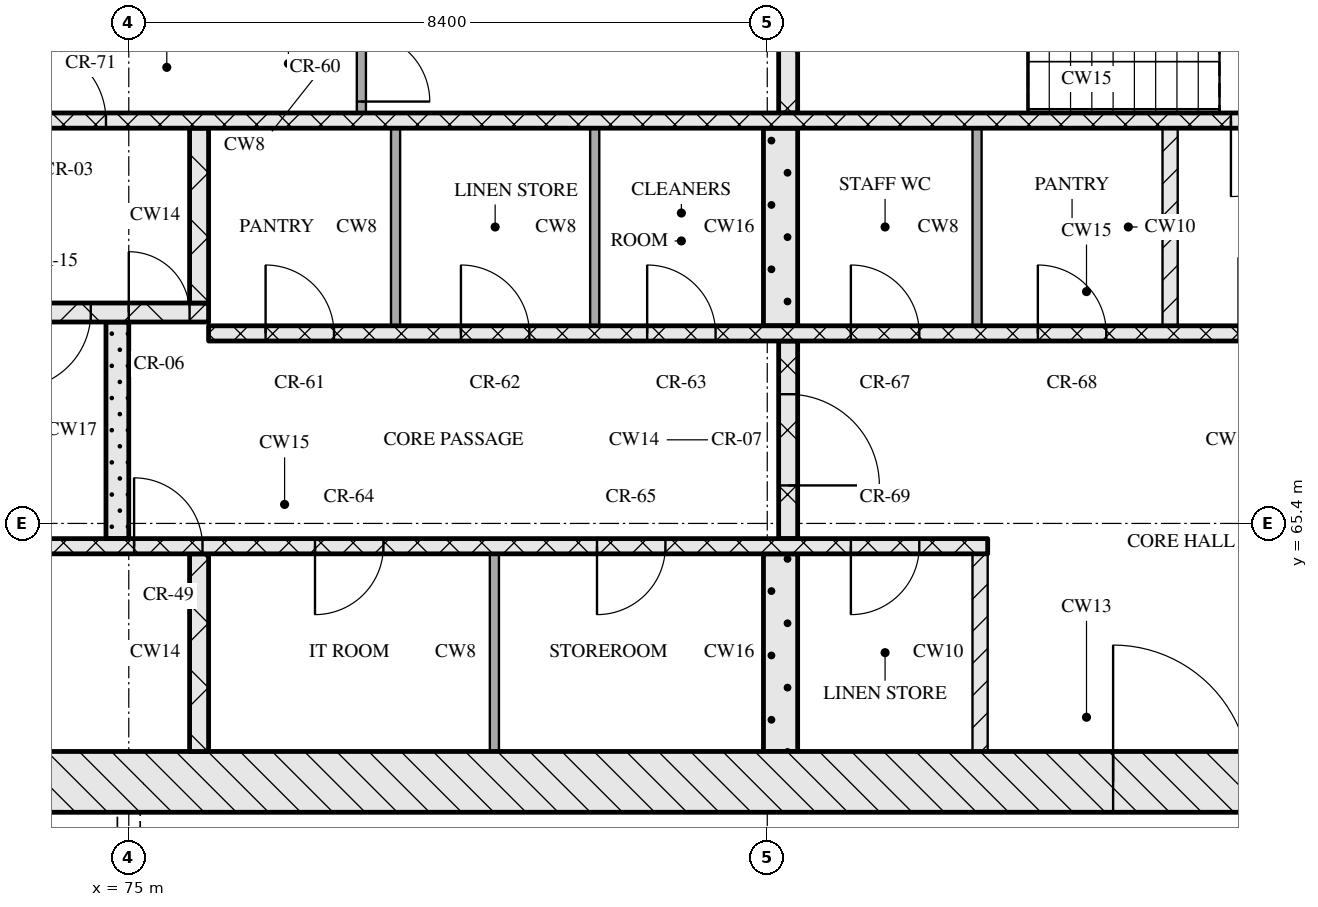
"""IFC4 building model, lengths in metres.
Left out: names, types, materials, properties, quantities, classifications, styles, units other than length and angle.
Written with IfcOpenShell. Run it as: python <this file> out.ifc"""

import sys

from ifc_helpers import new_model, si_unit, direction, frame, frame_2d, origin, place, context, subcontext, project, spatial, rectangle, extrude, element, fill, save


model = new_model("IFC4")
c1 = context("Model", 3, precision=1e-05, world=origin(), true_north=direction((0.0, 1.0)))
c2 = subcontext(c1, "Body", "Model", "MODEL_VIEW")
j1 = project(units=[si_unit("LENGTHUNIT", "METRE"), si_unit("PLANEANGLEUNIT", "RADIAN")], contexts=[c1])
p1 = place(None, origin())
s1 = spatial("IfcSite", under=j1, at=p1, CompositionType="ELEMENT")
p2 = place(p1, origin())
s2 = spatial("IfcBuilding", under=s1, at=p2, CompositionType="ELEMENT")
p3 = place(p2, frame((0.0, 0.0, 187.05)))
s3 = spatial("IfcBuildingStorey", under=s2, at=p3, CompositionType="ELEMENT", Elevation=187.05)
p4 = place(p3, frame((67.0, 62.0, 0.0), z_axis=(0.0, 0.0, 1.0), x_axis=(1.0, 0.0, 0.0)))
e1 = element("IfcWall", 1, at=p4, inside=s3, PredefinedType="SOLIDWALL", context=c2, shape_type="SweptSolid", body=[
    extrude(rectangle(XDim=41.2, YDim=0.8, at=frame_2d((20.6, 0.0))), origin(), (0.0, 0.0, 1.0), 3.32),
])
p5 = place(p4, frame((20.95, 0.0, 0.0)))
e2 = element("IfcOpeningElement", 2, at=p5, cuts=e1, PredefinedType="OPENING", context=c2, shape_type="SweptSolid", body=[
    extrude(rectangle(XDim=1.8, YDim=2.1, at=frame_2d((0.9, 1.05))), frame((0.0, 0.41, 0.0), z_axis=(0.0, -1.0, 0.0), x_axis=(1.0, 0.0, 0.0)), (0.0, 0.0, 1.0), 0.82),
])
p6 = place(p3, frame((75.925, 62.4, 0.0), z_axis=(0.0, 0.0, 1.0), x_axis=(0.0, 1.0, 0.0)))
e3 = element("IfcWall", 3, at=p6, inside=s3, PredefinedType="SOLIDWALL", context=c2, shape_type="SweptSolid", body=[
    extrude(rectangle(XDim=2.6, YDim=0.25, at=frame_2d((1.3, 0.0))), origin(), (0.0, 0.0, 1.0), 3.32),
])
p7 = place(p3, frame((79.81, 62.4, 0.0), z_axis=(0.0, 0.0, 1.0), x_axis=(0.0, 1.0, 0.0)))
e4 = element("IfcWall", 4, at=p7, inside=s3, PredefinedType="PARTITIONING", context=c2, shape_type="SweptSolid", body=[
    extrude(rectangle(XDim=2.6, YDim=0.12, at=frame_2d((1.3, 0.0))), origin(), (0.0, 0.0, 1.0), 3.32),
])
p8 = place(p3, frame((83.575, 62.4, 0.0), z_axis=(0.0, 0.0, 1.0), x_axis=(0.0, 1.0, 0.0)))
e5 = element("IfcWall", 5, at=p8, inside=s3, PredefinedType="SOLIDWALL", context=c2, shape_type="SweptSolid", body=[
    extrude(rectangle(XDim=2.6, YDim=0.45, at=frame_2d((1.3, 0.0))), origin(), (0.0, 0.0, 1.0), 3.32),
])
p9 = place(p3, frame((86.2, 62.4, 0.0), z_axis=(0.0, 0.0, 1.0), x_axis=(0.0, 1.0, 0.0)))
e6 = element("IfcWall", 6, at=p9, inside=s3, PredefinedType="PARTITIONING", context=c2, shape_type="SweptSolid", body=[
    extrude(rectangle(XDim=2.6, YDim=0.2, at=frame_2d((1.3, 0.0))), origin(), (0.0, 0.0, 1.0), 3.32),
])
p10 = place(p3, frame((67.8, 65.1, 0.0), z_axis=(0.0, 0.0, 1.0), x_axis=(1.0, 0.0, 0.0)))
e7 = element("IfcWall", 7, at=p10, inside=s3, PredefinedType="SOLIDWALL", context=c2, shape_type="SweptSolid", body=[
    extrude(rectangle(XDim=18.5, YDim=0.2, at=frame_2d((9.25, 0.0))), origin(), (0.0, 0.0, 1.0), 3.32),
])
p11 = place(p10, frame((7.27, 0.0, 0.0)))
e8 = element("IfcOpeningElement", 8, at=p11, cuts=e7, PredefinedType="OPENING", context=c2, shape_type="SweptSolid", body=[
    extrude(rectangle(XDim=0.9, YDim=2.1, at=frame_2d((0.45, 1.05))), frame((0.0, 0.11, 0.0), z_axis=(0.0, -1.0, 0.0), x_axis=(1.0, 0.0, 0.0)), (0.0, 0.0, 1.0), 0.22),
])
p12 = place(p10, frame((9.65, 0.0, 0.0)))
e9 = element("IfcOpeningElement", 9, at=p12, cuts=e7, PredefinedType="OPENING", context=c2, shape_type="SweptSolid", body=[
    extrude(rectangle(XDim=0.9, YDim=2.1, at=frame_2d((0.45, 1.05))), frame((0.0, 0.11, 0.0), z_axis=(0.0, -1.0, 0.0), x_axis=(1.0, 0.0, 0.0)), (0.0, 0.0, 1.0), 0.22),
])
p13 = place(p10, frame((13.36, 0.0, 0.0)))
e10 = element("IfcOpeningElement", 10, at=p13, cuts=e7, PredefinedType="OPENING", context=c2, shape_type="SweptSolid", body=[
    extrude(rectangle(XDim=0.9, YDim=2.1, at=frame_2d((0.45, 1.05))), frame((0.0, 0.11, 0.0), z_axis=(0.0, -1.0, 0.0), x_axis=(1.0, 0.0, 0.0)), (0.0, 0.0, 1.0), 0.22),
])
p14 = place(p10, frame((16.7, 0.0, 0.0)))
e11 = element("IfcOpeningElement", 11, at=p14, cuts=e7, PredefinedType="OPENING", context=c2, shape_type="SweptSolid", body=[
    extrude(rectangle(XDim=0.9, YDim=2.1, at=frame_2d((0.45, 1.05))), frame((0.0, 0.11, 0.0), z_axis=(0.0, -1.0, 0.0), x_axis=(1.0, 0.0, 0.0)), (0.0, 0.0, 1.0), 0.22),
])
p15 = place(p3, frame((74.85, 65.2, 0.0), z_axis=(0.0, 0.0, 1.0), x_axis=(0.0, 1.0, 0.0)))
e12 = element("IfcWall", 12, at=p15, inside=s3, PredefinedType="SOLIDWALL", context=c2, shape_type="SweptSolid", body=[
    extrude(rectangle(XDim=2.85, YDim=0.3, at=frame_2d((1.425, 0.0))), origin(), (0.0, 0.0, 1.0), 3.32),
])
p16 = place(p3, frame((83.675, 65.2, 0.0), z_axis=(0.0, 0.0, 1.0), x_axis=(0.0, 1.0, 0.0)))
e13 = element("IfcWall", 13, at=p16, inside=s3, PredefinedType="SOLIDWALL", context=c2, shape_type="SweptSolid", body=[
    extrude(rectangle(XDim=2.6, YDim=0.25, at=frame_2d((1.3, 0.0))), origin(), (0.0, 0.0, 1.0), 3.32),
])
p17 = place(p16, frame((0.7, 0.0, 0.0)))
e14 = element("IfcOpeningElement", 14, at=p17, cuts=e13, PredefinedType="OPENING", context=c2, shape_type="SweptSolid", body=[
    extrude(rectangle(XDim=1.2, YDim=2.1, at=frame_2d((0.6, 1.05))), frame((0.0, 0.135, 0.0), z_axis=(0.0, -1.0, 0.0), x_axis=(1.0, 0.0, 0.0)), (0.0, 0.0, 1.0), 0.27),
])
p18 = place(p3, frame((76.05, 67.9, 0.0), z_axis=(0.0, 0.0, 1.0), x_axis=(1.0, 0.0, 0.0)))
e15 = element("IfcWall", 15, at=p18, inside=s3, PredefinedType="SOLIDWALL", context=c2, shape_type="SweptSolid", body=[
    extrude(rectangle(XDim=23.1, YDim=0.2, at=frame_2d((11.55, 0.0))), origin(), (0.0, 0.0, 1.0), 3.32),
])
p19 = place(p18, frame((0.75, 0.0, 0.0)))
e16 = element("IfcOpeningElement", 16, at=p19, cuts=e15, PredefinedType="OPENING", context=c2, shape_type="SweptSolid", body=[
    extrude(rectangle(XDim=0.9, YDim=2.1, at=frame_2d((0.45, 1.05))), frame((0.0, 0.11, 0.0), z_axis=(0.0, -1.0, 0.0), x_axis=(1.0, 0.0, 0.0)), (0.0, 0.0, 1.0), 0.22),
])
p20 = place(p18, frame((3.32, 0.0, 0.0)))
e17 = element("IfcOpeningElement", 17, at=p20, cuts=e15, PredefinedType="OPENING", context=c2, shape_type="SweptSolid", body=[
    extrude(rectangle(XDim=0.9, YDim=2.1, at=frame_2d((0.45, 1.05))), frame((0.0, 0.11, 0.0), z_axis=(0.0, -1.0, 0.0), x_axis=(1.0, 0.0, 0.0)), (0.0, 0.0, 1.0), 0.22),
])
p21 = place(p18, frame((5.77, 0.0, 0.0)))
e18 = element("IfcOpeningElement", 18, at=p21, cuts=e15, PredefinedType="OPENING", context=c2, shape_type="SweptSolid", body=[
    extrude(rectangle(XDim=0.9, YDim=2.1, at=frame_2d((0.45, 1.05))), frame((0.0, 0.11, 0.0), z_axis=(0.0, -1.0, 0.0), x_axis=(1.0, 0.0, 0.0)), (0.0, 0.0, 1.0), 0.22),
])
p22 = place(p18, frame((8.45, 0.0, 0.0)))
e19 = element("IfcOpeningElement", 19, at=p22, cuts=e15, PredefinedType="OPENING", context=c2, shape_type="SweptSolid", body=[
    extrude(rectangle(XDim=0.9, YDim=2.1, at=frame_2d((0.45, 1.05))), frame((0.0, 0.11, 0.0), z_axis=(0.0, -1.0, 0.0), x_axis=(1.0, 0.0, 0.0)), (0.0, 0.0, 1.0), 0.22),
])
p23 = place(p18, frame((10.91, 0.0, 0.0)))
e20 = element("IfcOpeningElement", 20, at=p23, cuts=e15, PredefinedType="OPENING", context=c2, shape_type="SweptSolid", body=[
    extrude(rectangle(XDim=0.9, YDim=2.1, at=frame_2d((0.45, 1.05))), frame((0.0, 0.11, 0.0), z_axis=(0.0, -1.0, 0.0), x_axis=(1.0, 0.0, 0.0)), (0.0, 0.0, 1.0), 0.22),
])
p24 = place(p18, frame((13.55, 0.0, 0.0)))
e21 = element("IfcOpeningElement", 21, at=p24, cuts=e15, PredefinedType="OPENING", context=c2, shape_type="SweptSolid", body=[
    extrude(rectangle(XDim=1.0, YDim=2.1, at=frame_2d((0.5, 1.05))), frame((0.0, 0.11, 0.0), z_axis=(0.0, -1.0, 0.0), x_axis=(1.0, 0.0, 0.0)), (0.0, 0.0, 1.0), 0.22),
])
p25 = place(p18, frame((16.2, 0.0, 0.0)))
e22 = element("IfcOpeningElement", 22, at=p25, cuts=e15, PredefinedType="OPENING", context=c2, shape_type="SweptSolid", body=[
    extrude(rectangle(XDim=1.1, YDim=2.1, at=frame_2d((0.55, 1.05))), frame((0.0, 0.11, 0.0), z_axis=(0.0, -1.0, 0.0), x_axis=(1.0, 0.0, 0.0)), (0.0, 0.0, 1.0), 0.22),
])
p26 = place(p18, frame((18.7, 0.0, 0.0)))
e23 = element("IfcOpeningElement", 23, at=p26, cuts=e15, PredefinedType="OPENING", context=c2, shape_type="SweptSolid", body=[
    extrude(rectangle(XDim=1.1, YDim=2.1, at=frame_2d((0.55, 1.05))), frame((0.0, 0.11, 0.0), z_axis=(0.0, -1.0, 0.0), x_axis=(1.0, 0.0, 0.0)), (0.0, 0.0, 1.0), 0.22),
])
p27 = place(p18, frame((21.2, 0.0, 0.0)))
e24 = element("IfcOpeningElement", 24, at=p27, cuts=e15, PredefinedType="OPENING", context=c2, shape_type="SweptSolid", body=[
    extrude(rectangle(XDim=1.1, YDim=2.1, at=frame_2d((0.55, 1.05))), frame((0.0, 0.11, 0.0), z_axis=(0.0, -1.0, 0.0), x_axis=(1.0, 0.0, 0.0)), (0.0, 0.0, 1.0), 0.22),
])
for number, where, z_axis, x_axis in (
    (25, (78.51, 68.0, 0.0), (0.0, 0.0, 1.0), (0.0, 1.0, 0.0)),
    (26, (81.13, 68.0, 0.0), (0.0, 0.0, 1.0), (0.0, 1.0, 0.0)),
):
    element("IfcWall", number, at=place(p3, frame(where, z_axis=z_axis, x_axis=x_axis)), inside=s3, PredefinedType="PARTITIONING", context=c2, shape_type="SweptSolid", body=[
        extrude(rectangle(XDim=2.6, YDim=0.12, at=frame_2d((1.3, 0.0))), origin(), (0.0, 0.0, 1.0), 3.32),
    ])
p28 = place(p3, frame((83.575, 68.0, 0.0), z_axis=(0.0, 0.0, 1.0), x_axis=(0.0, 1.0, 0.0)))
e27 = element("IfcWall", 27, at=p28, inside=s3, PredefinedType="SOLIDWALL", context=c2, shape_type="SweptSolid", body=[
    extrude(rectangle(XDim=2.6, YDim=0.45, at=frame_2d((1.3, 0.0))), origin(), (0.0, 0.0, 1.0), 3.32),
])
p29 = place(p3, frame((86.16, 68.0, 0.0), z_axis=(0.0, 0.0, 1.0), x_axis=(0.0, 1.0, 0.0)))
e28 = element("IfcWall", 28, at=p29, inside=s3, PredefinedType="PARTITIONING", context=c2, shape_type="SweptSolid", body=[
    extrude(rectangle(XDim=2.6, YDim=0.12, at=frame_2d((1.3, 0.0))), origin(), (0.0, 0.0, 1.0), 3.32),
])
p30 = place(p3, frame((88.7, 68.0, 0.0), z_axis=(0.0, 0.0, 1.0), x_axis=(0.0, 1.0, 0.0)))
e29 = element("IfcWall", 29, at=p30, inside=s3, PredefinedType="PARTITIONING", context=c2, shape_type="SweptSolid", body=[
    extrude(rectangle(XDim=2.6, YDim=0.2, at=frame_2d((1.3, 0.0))), origin(), (0.0, 0.0, 1.0), 3.32),
])
p31 = place(p3, frame((67.8, 68.175, 0.0), z_axis=(0.0, 0.0, 1.0), x_axis=(1.0, 0.0, 0.0)))
e30 = element("IfcWall", 30, at=p31, inside=s3, PredefinedType="SOLIDWALL", context=c2, shape_type="SweptSolid", body=[
    extrude(rectangle(XDim=8.25, YDim=0.25, at=frame_2d((4.125, 0.0))), origin(), (0.0, 0.0, 1.0), 3.32),
])
p32 = place(p31, frame((5.7, 0.0, 0.0)))
e31 = element("IfcOpeningElement", 31, at=p32, cuts=e30, PredefinedType="OPENING", context=c2, shape_type="SweptSolid", body=[
    extrude(rectangle(XDim=1.0, YDim=2.1, at=frame_2d((0.5, 1.05))), frame((0.0, 0.135, 0.0), z_axis=(0.0, -1.0, 0.0), x_axis=(1.0, 0.0, 0.0)), (0.0, 0.0, 1.0), 0.27),
])
p33 = place(p31, frame((7.2, 0.0, 0.0)))
e32 = element("IfcOpeningElement", 32, at=p33, cuts=e30, PredefinedType="OPENING", context=c2, shape_type="SweptSolid", body=[
    extrude(rectangle(XDim=0.8, YDim=2.1, at=frame_2d((0.4, 1.05))), frame((0.0, 0.135, 0.0), z_axis=(0.0, -1.0, 0.0), x_axis=(1.0, 0.0, 0.0)), (0.0, 0.0, 1.0), 0.27),
])
p34 = place(p3, frame((75.925, 68.3, 0.0), z_axis=(0.0, 0.0, 1.0), x_axis=(0.0, 1.0, 0.0)))
e33 = element("IfcWall", 33, at=p34, inside=s3, PredefinedType="SOLIDWALL", context=c2, shape_type="SweptSolid", body=[
    extrude(rectangle(XDim=2.3, YDim=0.25, at=frame_2d((1.15, 0.0))), origin(), (0.0, 0.0, 1.0), 3.32),
])
p35 = place(p3, frame((67.8, 70.7, 0.0), z_axis=(0.0, 0.0, 1.0), x_axis=(1.0, 0.0, 0.0)))
e34 = element("IfcWall", 34, at=p35, inside=s3, PredefinedType="SOLIDWALL", context=c2, shape_type="SweptSolid", body=[
    extrude(rectangle(XDim=39.6, YDim=0.2, at=frame_2d((19.8, 0.0))), origin(), (0.0, 0.0, 1.0), 3.32),
])
p36 = place(p35, frame((0.65, 0.0, 0.0)))
e35 = element("IfcOpeningElement", 35, at=p36, cuts=e34, PredefinedType="OPENING", context=c2, shape_type="SweptSolid", body=[
    extrude(rectangle(XDim=1.1, YDim=2.1, at=frame_2d((0.55, 1.05))), frame((0.0, 0.11, 0.0), z_axis=(0.0, -1.0, 0.0), x_axis=(1.0, 0.0, 0.0)), (0.0, 0.0, 1.0), 0.22),
])
p37 = place(p35, frame((3.25, 0.0, 0.0)))
e36 = element("IfcOpeningElement", 36, at=p37, cuts=e34, PredefinedType="OPENING", context=c2, shape_type="SweptSolid", body=[
    extrude(rectangle(XDim=1.1, YDim=2.1, at=frame_2d((0.55, 1.05))), frame((0.0, 0.11, 0.0), z_axis=(0.0, -1.0, 0.0), x_axis=(1.0, 0.0, 0.0)), (0.0, 0.0, 1.0), 0.22),
])
p38 = place(p35, frame((5.9, 0.0, 0.0)))
e37 = element("IfcOpeningElement", 37, at=p38, cuts=e34, PredefinedType="OPENING", context=c2, shape_type="SweptSolid", body=[
    extrude(rectangle(XDim=1.0, YDim=2.1, at=frame_2d((0.5, 1.05))), frame((0.0, 0.11, 0.0), z_axis=(0.0, -1.0, 0.0), x_axis=(1.0, 0.0, 0.0)), (0.0, 0.0, 1.0), 0.22),
])
p39 = place(p35, frame((21.7, 0.0, 0.0)))
e38 = element("IfcOpeningElement", 38, at=p39, cuts=e34, PredefinedType="OPENING", context=c2, shape_type="SweptSolid", body=[
    extrude(rectangle(XDim=1.0, YDim=2.1, at=frame_2d((0.5, 1.05))), frame((0.0, 0.11, 0.0), z_axis=(0.0, -1.0, 0.0), x_axis=(1.0, 0.0, 0.0)), (0.0, 0.0, 1.0), 0.22),
])
p40 = place(p35, frame((32.7, 0.0, 0.0)))
e39 = element("IfcOpeningElement", 39, at=p40, cuts=e34, PredefinedType="OPENING", context=c2, shape_type="SweptSolid", body=[
    extrude(rectangle(XDim=1.0, YDim=2.1, at=frame_2d((0.5, 1.05))), frame((0.0, 0.11, 0.0), z_axis=(0.0, -1.0, 0.0), x_axis=(1.0, 0.0, 0.0)), (0.0, 0.0, 1.0), 0.22),
])
p41 = place(p35, frame((35.25, 0.0, 0.0)))
e40 = element("IfcOpeningElement", 40, at=p41, cuts=e34, PredefinedType="OPENING", context=c2, shape_type="SweptSolid", body=[
    extrude(rectangle(XDim=1.1, YDim=2.1, at=frame_2d((0.55, 1.05))), frame((0.0, 0.11, 0.0), z_axis=(0.0, -1.0, 0.0), x_axis=(1.0, 0.0, 0.0)), (0.0, 0.0, 1.0), 0.22),
])
p42 = place(p35, frame((37.85, 0.0, 0.0)))
e41 = element("IfcOpeningElement", 41, at=p42, cuts=e34, PredefinedType="OPENING", context=c2, shape_type="SweptSolid", body=[
    extrude(rectangle(XDim=1.1, YDim=2.1, at=frame_2d((0.55, 1.05))), frame((0.0, 0.11, 0.0), z_axis=(0.0, -1.0, 0.0), x_axis=(1.0, 0.0, 0.0)), (0.0, 0.0, 1.0), 0.22),
])
p43 = place(p3, frame((78.06, 70.8, 0.0), z_axis=(0.0, 0.0, 1.0), x_axis=(0.0, 1.0, 0.0)))
e42 = element("IfcWall", 42, at=p43, inside=s3, PredefinedType="PARTITIONING", context=c2, shape_type="SweptSolid", body=[
    extrude(rectangle(XDim=1.2, YDim=0.12, at=frame_2d((0.6, 0.0))), origin(), (0.0, 0.0, 1.0), 3.32),
])
p44 = place(p43, frame((0.15, 0.0, 0.0)))
e43 = element("IfcOpeningElement", 43, at=p44, cuts=e42, PredefinedType="OPENING", context=c2, shape_type="SweptSolid", body=[
    extrude(rectangle(XDim=0.9, YDim=2.1, at=frame_2d((0.45, 1.05))), frame((0.0, 0.07, 0.0), z_axis=(0.0, -1.0, 0.0), x_axis=(1.0, 0.0, 0.0)), (0.0, 0.0, 1.0), 0.14),
])
p45 = place(p3, frame((83.675, 70.8, 0.0), z_axis=(0.0, 0.0, 1.0), x_axis=(0.0, 1.0, 0.0)))
e44 = element("IfcWall", 44, at=p45, inside=s3, PredefinedType="SOLIDWALL", context=c2, shape_type="SweptSolid", body=[
    extrude(rectangle(XDim=2.95, YDim=0.25, at=frame_2d((1.475, 0.0))), origin(), (0.0, 0.0, 1.0), 3.32),
])
p46 = place(p5, origin())
e45 = element("IfcDoor", 45, at=p46, inside=s3, OperationType="DOUBLE_DOOR_SINGLE_SWING", PredefinedType="DOOR", context=c2, shape_type="SweptSolid", body=[
    extrude(rectangle(XDim=1.8, YDim=2.1, at=frame_2d((0.9, 1.05))), frame((0.0, 0.025, 0.0), z_axis=(0.0, -1.0, 0.0), x_axis=(1.0, 0.0, 0.0)), (0.0, 0.0, 1.0), 0.05),
])
fill(e2, e45)
p47 = place(p11, origin())
e46 = element("IfcDoor", 46, at=p47, inside=s3, OperationType="SINGLE_SWING_LEFT", PredefinedType="DOOR", context=c2, shape_type="SweptSolid", body=[
    extrude(rectangle(XDim=0.9, YDim=2.1, at=frame_2d((0.45, 1.05))), frame((0.0, 0.025, 0.0), z_axis=(0.0, -1.0, 0.0), x_axis=(1.0, 0.0, 0.0)), (0.0, 0.0, 1.0), 0.05),
])
fill(e8, e46)
p48 = place(p12, origin())
e47 = element("IfcDoor", 47, at=p48, inside=s3, OperationType="SINGLE_SWING_RIGHT", PredefinedType="DOOR", context=c2, shape_type="SweptSolid", body=[
    extrude(rectangle(XDim=0.9, YDim=2.1, at=frame_2d((0.45, 1.05))), frame((0.0, 0.025, 0.0), z_axis=(0.0, -1.0, 0.0), x_axis=(1.0, 0.0, 0.0)), (0.0, 0.0, 1.0), 0.05),
])
fill(e9, e47)
p49 = place(p13, origin())
e48 = element("IfcDoor", 48, at=p49, inside=s3, OperationType="SINGLE_SWING_RIGHT", PredefinedType="DOOR", context=c2, shape_type="SweptSolid", body=[
    extrude(rectangle(XDim=0.9, YDim=2.1, at=frame_2d((0.45, 1.05))), frame((0.0, 0.025, 0.0), z_axis=(0.0, -1.0, 0.0), x_axis=(1.0, 0.0, 0.0)), (0.0, 0.0, 1.0), 0.05),
])
fill(e10, e48)
p50 = place(p14, origin())
e49 = element("IfcDoor", 49, at=p50, inside=s3, OperationType="SINGLE_SWING_RIGHT", PredefinedType="DOOR", context=c2, shape_type="SweptSolid", body=[
    extrude(rectangle(XDim=0.9, YDim=2.1, at=frame_2d((0.45, 1.05))), frame((0.0, 0.025, 0.0), z_axis=(0.0, -1.0, 0.0), x_axis=(1.0, 0.0, 0.0)), (0.0, 0.0, 1.0), 0.05),
])
fill(e11, e49)
p51 = place(p17, origin())
e50 = element("IfcDoor", 50, at=p51, inside=s3, OperationType="SINGLE_SWING_RIGHT", PredefinedType="DOOR", context=c2, shape_type="SweptSolid", body=[
    extrude(rectangle(XDim=1.2, YDim=2.1, at=frame_2d((0.6, 1.05))), frame((0.0, 0.025, 0.0), z_axis=(0.0, -1.0, 0.0), x_axis=(1.0, 0.0, 0.0)), (0.0, 0.0, 1.0), 0.05),
])
fill(e14, e50)
p52 = place(p19, origin())
e51 = element("IfcDoor", 51, at=p52, inside=s3, OperationType="SINGLE_SWING_LEFT", PredefinedType="DOOR", context=c2, shape_type="SweptSolid", body=[
    extrude(rectangle(XDim=0.9, YDim=2.1, at=frame_2d((0.45, 1.05))), frame((0.0, 0.025, 0.0), z_axis=(0.0, -1.0, 0.0), x_axis=(1.0, 0.0, 0.0)), (0.0, 0.0, 1.0), 0.05),
])
fill(e16, e51)
p53 = place(p20, origin())
e52 = element("IfcDoor", 52, at=p53, inside=s3, OperationType="SINGLE_SWING_LEFT", PredefinedType="DOOR", context=c2, shape_type="SweptSolid", body=[
    extrude(rectangle(XDim=0.9, YDim=2.1, at=frame_2d((0.45, 1.05))), frame((0.0, 0.025, 0.0), z_axis=(0.0, -1.0, 0.0), x_axis=(1.0, 0.0, 0.0)), (0.0, 0.0, 1.0), 0.05),
])
fill(e17, e52)
p54 = place(p21, origin())
e53 = element("IfcDoor", 53, at=p54, inside=s3, OperationType="SINGLE_SWING_LEFT", PredefinedType="DOOR", context=c2, shape_type="SweptSolid", body=[
    extrude(rectangle(XDim=0.9, YDim=2.1, at=frame_2d((0.45, 1.05))), frame((0.0, 0.025, 0.0), z_axis=(0.0, -1.0, 0.0), x_axis=(1.0, 0.0, 0.0)), (0.0, 0.0, 1.0), 0.05),
])
fill(e18, e53)
p55 = place(p22, origin())
e54 = element("IfcDoor", 54, at=p55, inside=s3, OperationType="SINGLE_SWING_LEFT", PredefinedType="DOOR", context=c2, shape_type="SweptSolid", body=[
    extrude(rectangle(XDim=0.9, YDim=2.1, at=frame_2d((0.45, 1.05))), frame((0.0, 0.025, 0.0), z_axis=(0.0, -1.0, 0.0), x_axis=(1.0, 0.0, 0.0)), (0.0, 0.0, 1.0), 0.05),
])
fill(e19, e54)
p56 = place(p23, origin())
e55 = element("IfcDoor", 55, at=p56, inside=s3, OperationType="SINGLE_SWING_LEFT", PredefinedType="DOOR", context=c2, shape_type="SweptSolid", body=[
    extrude(rectangle(XDim=0.9, YDim=2.1, at=frame_2d((0.45, 1.05))), frame((0.0, 0.025, 0.0), z_axis=(0.0, -1.0, 0.0), x_axis=(1.0, 0.0, 0.0)), (0.0, 0.0, 1.0), 0.05),
])
fill(e20, e55)
p57 = place(p32, origin())
e56 = element("IfcDoor", 56, at=p57, inside=s3, OperationType="SINGLE_SWING_RIGHT", PredefinedType="DOOR", context=c2, shape_type="SweptSolid", body=[
    extrude(rectangle(XDim=1.0, YDim=2.1, at=frame_2d((0.5, 1.05))), frame((0.0, 0.025, 0.0), z_axis=(0.0, -1.0, 0.0), x_axis=(1.0, 0.0, 0.0)), (0.0, 0.0, 1.0), 0.05),
])
fill(e31, e56)
p58 = place(p33, origin())
e57 = element("IfcDoor", 57, at=p58, inside=s3, OperationType="SINGLE_SWING_LEFT", PredefinedType="DOOR", context=c2, shape_type="SweptSolid", body=[
    extrude(rectangle(XDim=0.8, YDim=2.1, at=frame_2d((0.4, 1.05))), frame((0.0, 0.025, 0.0), z_axis=(0.0, -1.0, 0.0), x_axis=(1.0, 0.0, 0.0)), (0.0, 0.0, 1.0), 0.05),
])
fill(e32, e57)
p59 = place(p38, origin())
e58 = element("IfcDoor", 58, at=p59, inside=s3, OperationType="SINGLE_SWING_LEFT", PredefinedType="DOOR", context=c2, shape_type="SweptSolid", body=[
    extrude(rectangle(XDim=1.0, YDim=2.1, at=frame_2d((0.5, 1.05))), frame((0.0, 0.025, 0.0), z_axis=(0.0, -1.0, 0.0), x_axis=(1.0, 0.0, 0.0)), (0.0, 0.0, 1.0), 0.05),
])
fill(e37, e58)
p60 = place(p39, origin())
e59 = element("IfcDoor", 59, at=p60, inside=s3, OperationType="SINGLE_SWING_RIGHT", PredefinedType="DOOR", context=c2, shape_type="SweptSolid", body=[
    extrude(rectangle(XDim=1.0, YDim=2.1, at=frame_2d((0.5, 1.05))), frame((0.0, 0.025, 0.0), z_axis=(0.0, -1.0, 0.0), x_axis=(1.0, 0.0, 0.0)), (0.0, 0.0, 1.0), 0.05),
])
fill(e38, e59)
p61 = place(p44, origin())
e60 = element("IfcDoor", 60, at=p61, inside=s3, OperationType="SINGLE_SWING_RIGHT", PredefinedType="DOOR", context=c2, shape_type="SweptSolid", body=[
    extrude(rectangle(XDim=0.9, YDim=2.1, at=frame_2d((0.45, 1.05))), frame((0.0, 0.025, 0.0), z_axis=(0.0, -1.0, 0.0), x_axis=(1.0, 0.0, 0.0)), (0.0, 0.0, 1.0), 0.05),
])
fill(e43, e60)
save(model, sys.argv[1])
